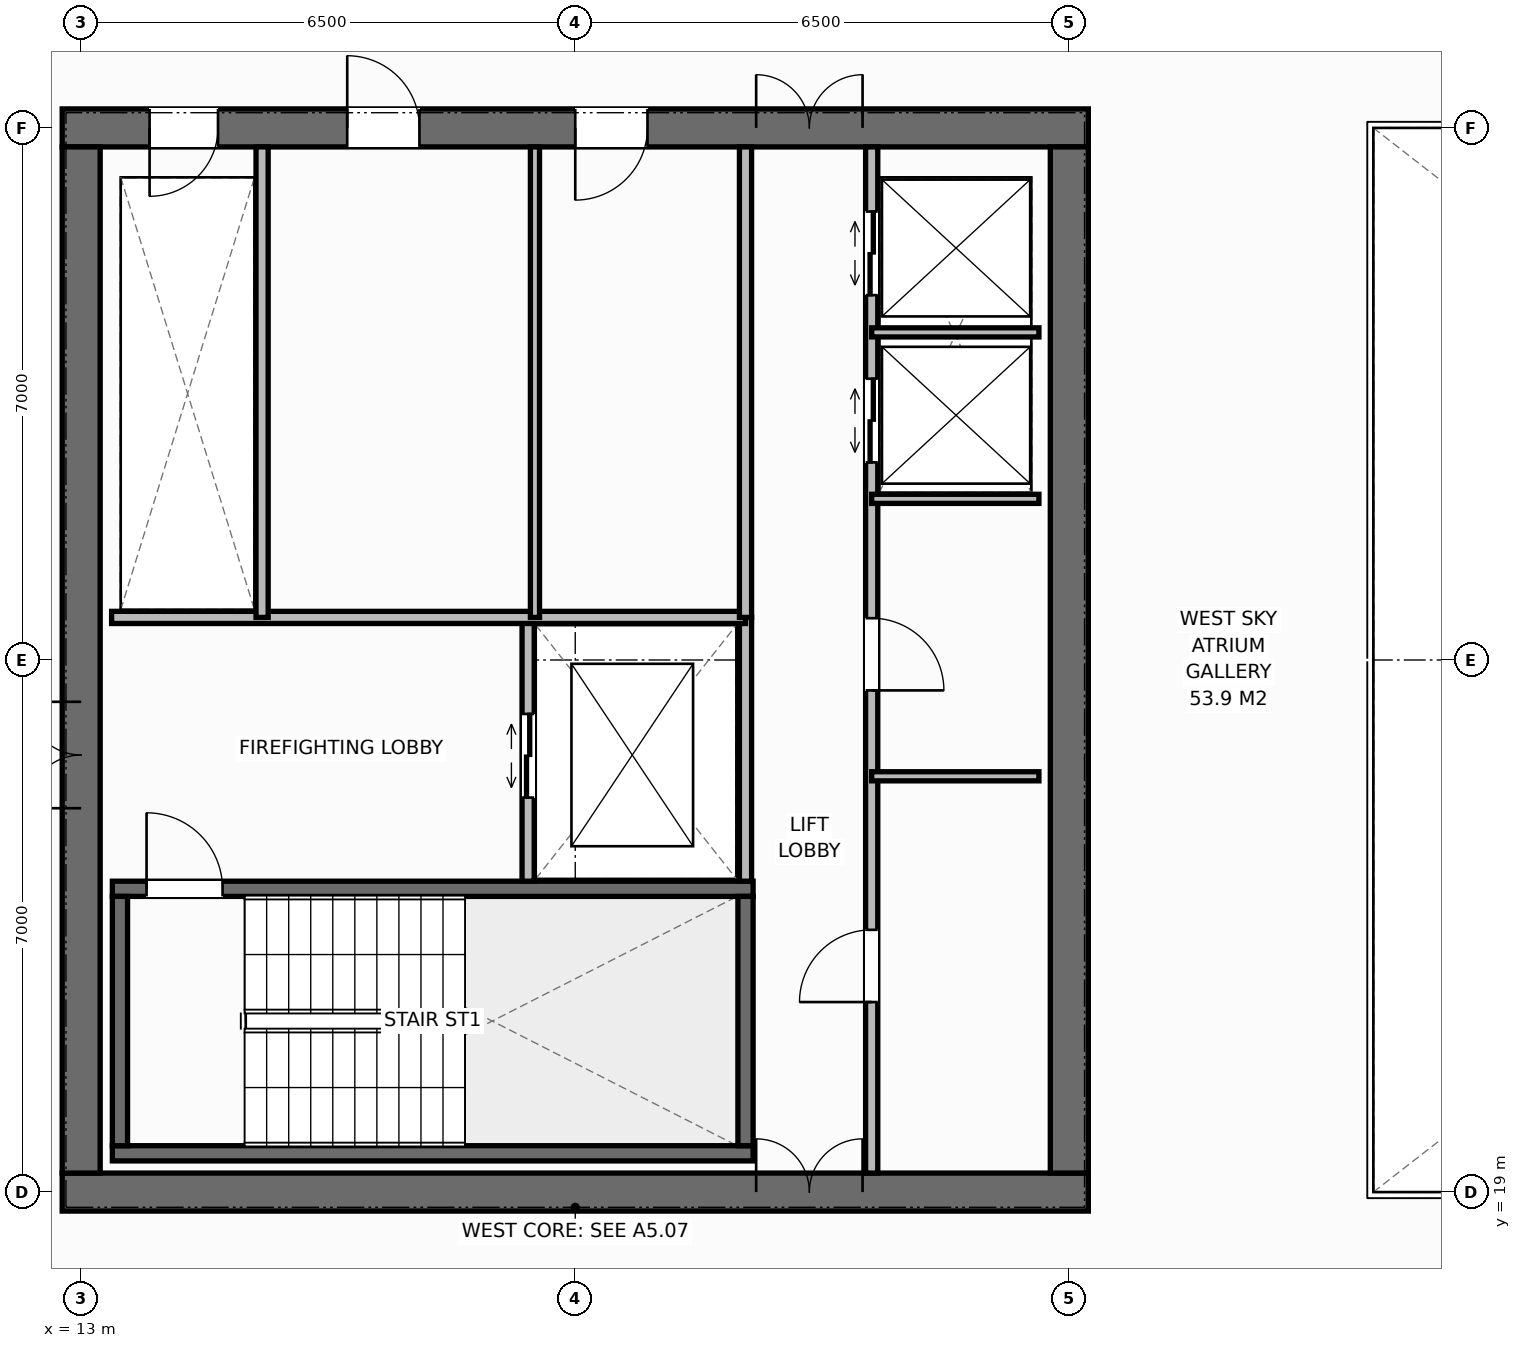
"""IFC4 building model, lengths in metres.
Left out: names, types, materials, properties, quantities, classifications, styles, units other than length and angle.
Written with IfcOpenShell. Run it as: python <this file> out.ifc"""

import sys

from ifc_helpers import new_model, si_unit, direction, frame, frame_2d, origin, place, context, subcontext, project, spatial, rectangle, extrude, element, fill, save


model = new_model("IFC4")
c1 = context("Model", 3, precision=1e-05, world=origin(), true_north=direction((0.0, 1.0)))
c2 = subcontext(c1, "Body", "Model", "MODEL_VIEW")
j1 = project(units=[si_unit("LENGTHUNIT", "METRE"), si_unit("PLANEANGLEUNIT", "RADIAN")], contexts=[c1])
p1 = place(None, origin())
s1 = spatial("IfcSite", under=j1, at=p1, CompositionType="ELEMENT")
p2 = place(p1, origin())
s2 = spatial("IfcBuilding", under=s1, at=p2, CompositionType="ELEMENT")
p3 = place(p2, frame((0.0, 0.0, 225.2)))
s3 = spatial("IfcBuildingStorey", under=s2, at=p3, CompositionType="ELEMENT", Elevation=225.2)
p4 = place(p3, frame((12.75, 19.0, 0.0), z_axis=(0.0, 0.0, 1.0), x_axis=(1.0, 0.0, 0.0)))
e1 = element("IfcWall", 1, at=p4, inside=s3, PredefinedType="SHEAR", context=c2, shape_type="SweptSolid", body=[
    extrude(rectangle(XDim=13.5, YDim=0.5, at=frame_2d((6.75, 0.0))), origin(), (0.0, 0.0, 1.0), 3.8),
])
p5 = place(p4, frame((9.13, 0.0, 0.0)))
e2 = element("IfcOpeningElement", 2, at=p5, cuts=e1, PredefinedType="OPENING", context=c2, shape_type="SweptSolid", body=[
    extrude(rectangle(XDim=1.4, YDim=2.2, at=frame_2d((0.7, 1.1))), frame((0.0, 0.26, 0.0), z_axis=(0.0, -1.0, 0.0), x_axis=(1.0, 0.0, 0.0)), (0.0, 0.0, 1.0), 0.52),
])
p6 = place(p3, frame((12.75, 33.0, 0.0), z_axis=(0.0, 0.0, 1.0), x_axis=(1.0, 0.0, 0.0)))
e3 = element("IfcWall", 3, at=p6, inside=s3, PredefinedType="SHEAR", context=c2, shape_type="SweptSolid", body=[
    extrude(rectangle(XDim=13.5, YDim=0.5, at=frame_2d((6.75, 0.0))), origin(), (0.0, 0.0, 1.0), 3.8),
])
p7 = place(p6, frame((1.15, 0.0, 0.0)))
e4 = element("IfcOpeningElement", 4, at=p7, cuts=e3, PredefinedType="OPENING", context=c2, shape_type="SweptSolid", body=[
    extrude(rectangle(XDim=0.9, YDim=2.15, at=frame_2d((0.45, 1.075))), frame((0.0, 0.26, 0.0), z_axis=(0.0, -1.0, 0.0), x_axis=(1.0, 0.0, 0.0)), (0.0, 0.0, 1.0), 0.52),
])
p8 = place(p6, frame((3.75, 0.0, 0.0)))
e5 = element("IfcOpeningElement", 5, at=p8, cuts=e3, PredefinedType="OPENING", context=c2, shape_type="SweptSolid", body=[
    extrude(rectangle(XDim=0.95, YDim=2.15, at=frame_2d((0.475, 1.075))), frame((0.0, 0.26, 0.0), z_axis=(0.0, -1.0, 0.0), x_axis=(1.0, 0.0, 0.0)), (0.0, 0.0, 1.0), 0.52),
])
p9 = place(p6, frame((6.75, 0.0, 0.0)))
e6 = element("IfcOpeningElement", 6, at=p9, cuts=e3, PredefinedType="OPENING", context=c2, shape_type="SweptSolid", body=[
    extrude(rectangle(XDim=0.95, YDim=2.15, at=frame_2d((0.475, 1.075))), frame((0.0, 0.26, 0.0), z_axis=(0.0, -1.0, 0.0), x_axis=(1.0, 0.0, 0.0)), (0.0, 0.0, 1.0), 0.52),
])
p10 = place(p6, frame((9.13, 0.0, 0.0)))
e7 = element("IfcOpeningElement", 7, at=p10, cuts=e3, PredefinedType="OPENING", context=c2, shape_type="SweptSolid", body=[
    extrude(rectangle(XDim=1.4, YDim=2.2, at=frame_2d((0.7, 1.1))), frame((0.0, 0.26, 0.0), z_axis=(0.0, -1.0, 0.0), x_axis=(1.0, 0.0, 0.0)), (0.0, 0.0, 1.0), 0.52),
])
p11 = place(p3, frame((13.0, 19.25, 0.0), z_axis=(0.0, 0.0, 1.0), x_axis=(0.0, 1.0, 0.0)))
e8 = element("IfcWall", 8, at=p11, inside=s3, PredefinedType="SHEAR", context=c2, shape_type="SweptSolid", body=[
    extrude(rectangle(XDim=13.5, YDim=0.5, at=frame_2d((6.75, 0.0))), origin(), (0.0, 0.0, 1.0), 3.8),
])
p12 = place(p11, frame((4.8, 0.0, 0.0)))
e9 = element("IfcOpeningElement", 9, at=p12, cuts=e8, PredefinedType="OPENING", context=c2, shape_type="SweptSolid", body=[
    extrude(rectangle(XDim=1.4, YDim=2.2, at=frame_2d((0.7, 1.1))), frame((0.0, 0.26, 0.0), z_axis=(0.0, -1.0, 0.0), x_axis=(1.0, 0.0, 0.0)), (0.0, 0.0, 1.0), 0.52),
])
p13 = place(p3, frame((26.0, 19.25, 0.0), z_axis=(0.0, 0.0, 1.0), x_axis=(0.0, 1.0, 0.0)))
e10 = element("IfcWall", 10, at=p13, inside=s3, PredefinedType="SHEAR", context=c2, shape_type="SweptSolid", body=[
    extrude(rectangle(XDim=13.5, YDim=0.5, at=frame_2d((6.75, 0.0))), origin(), (0.0, 0.0, 1.0), 3.8),
])
p14 = place(p3, frame((13.41, 19.51, 0.0), z_axis=(0.0, 0.0, 1.0), x_axis=(1.0, 0.0, 0.0)))
e11 = element("IfcWall", 11, at=p14, inside=s3, PredefinedType="SHEAR", context=c2, shape_type="SweptSolid", body=[
    extrude(rectangle(XDim=8.43, YDim=0.2, at=frame_2d((4.215, 0.0))), origin(), (0.0, 0.0, 1.0), 3.8),
])
p15 = place(p3, frame((13.41, 22.99, 0.0), z_axis=(0.0, 0.0, 1.0), x_axis=(1.0, 0.0, 0.0)))
e12 = element("IfcWall", 12, at=p15, inside=s3, PredefinedType="SHEAR", context=c2, shape_type="SweptSolid", body=[
    extrude(rectangle(XDim=8.43, YDim=0.2, at=frame_2d((4.215, 0.0))), origin(), (0.0, 0.0, 1.0), 3.8),
])
p16 = place(p15, frame((0.45, 0.0, 0.0)))
e13 = element("IfcOpeningElement", 13, at=p16, cuts=e12, PredefinedType="OPENING", context=c2, shape_type="SweptSolid", body=[
    extrude(rectangle(XDim=1.0, YDim=2.15, at=frame_2d((0.5, 1.075))), frame((0.0, 0.11, 0.0), z_axis=(0.0, -1.0, 0.0), x_axis=(1.0, 0.0, 0.0)), (0.0, 0.0, 1.0), 0.22),
])
for number, where, z_axis, x_axis in (
    (14, (13.51, 19.61, 0.0), (0.0, 0.0, 1.0), (0.0, 1.0, 0.0)),
    (15, (21.74, 19.61, 0.0), (0.0, 0.0, 1.0), (0.0, 1.0, 0.0)),
):
    element("IfcWall", number, at=place(p3, frame(where, z_axis=z_axis, x_axis=x_axis)), inside=s3, PredefinedType="SHEAR", context=c2, shape_type="SweptSolid", body=[
        extrude(rectangle(XDim=3.28, YDim=0.2, at=frame_2d((1.64, 0.0))), origin(), (0.0, 0.0, 1.0), 3.8),
    ])
p17 = place(p3, frame((21.74, 23.09, 0.0), z_axis=(0.0, 0.0, 1.0), x_axis=(0.0, 1.0, 0.0)))
e16 = element("IfcWall", 16, at=p17, inside=s3, PredefinedType="STANDARD", context=c2, shape_type="SweptSolid", body=[
    extrude(rectangle(XDim=3.47, YDim=0.16, at=frame_2d((1.735, 0.0))), origin(), (0.0, 0.0, 1.0), 3.58),
])
p18 = place(p3, frame((18.88, 23.09, 0.0), z_axis=(0.0, 0.0, 1.0), x_axis=(0.0, 1.0, 0.0)))
e17 = element("IfcWall", 17, at=p18, inside=s3, PredefinedType="STANDARD", context=c2, shape_type="SweptSolid", body=[
    extrude(rectangle(XDim=3.47, YDim=0.16, at=frame_2d((1.735, 0.0))), origin(), (0.0, 0.0, 1.0), 3.58),
])
p19 = place(p18, frame((1.1, 0.0, 0.0)))
e18 = element("IfcOpeningElement", 18, at=p19, cuts=e17, PredefinedType="OPENING", context=c2, shape_type="SweptSolid", body=[
    extrude(rectangle(XDim=1.1, YDim=2.2, at=frame_2d((0.55, 1.1))), frame((0.0, 0.09, 0.0), z_axis=(0.0, -1.0, 0.0), x_axis=(1.0, 0.0, 0.0)), (0.0, 0.0, 1.0), 0.18),
])
p20 = place(p3, frame((13.4, 26.56, 0.0), z_axis=(0.0, 0.0, 1.0), x_axis=(1.0, 0.0, 0.0)))
e19 = element("IfcWall", 19, at=p20, inside=s3, PredefinedType="STANDARD", context=c2, shape_type="SweptSolid", body=[
    extrude(rectangle(XDim=8.34, YDim=0.16, at=frame_2d((4.17, 0.0))), origin(), (0.0, 0.0, 1.0), 3.58),
])
p21 = place(p3, frame((15.38, 26.56, 0.0), z_axis=(0.0, 0.0, 1.0), x_axis=(0.0, 1.0, 0.0)))
e20 = element("IfcWall", 20, at=p21, inside=s3, PredefinedType="STANDARD", context=c2, shape_type="SweptSolid", body=[
    extrude(rectangle(XDim=6.19, YDim=0.16, at=frame_2d((3.095, 0.0))), origin(), (0.0, 0.0, 1.0), 3.58),
])
p22 = place(p3, frame((18.97, 26.56, 0.0), z_axis=(0.0, 0.0, 1.0), x_axis=(0.0, 1.0, 0.0)))
e21 = element("IfcWall", 21, at=p22, inside=s3, PredefinedType="PARTITIONING", context=c2, shape_type="SweptSolid", body=[
    extrude(rectangle(XDim=6.19, YDim=0.12, at=frame_2d((3.095, 0.0))), origin(), (0.0, 0.0, 1.0), 3.58),
])
p23 = place(p3, frame((21.74, 26.56, 0.0), z_axis=(0.0, 0.0, 1.0), x_axis=(0.0, 1.0, 0.0)))
e22 = element("IfcWall", 22, at=p23, inside=s3, PredefinedType="STANDARD", context=c2, shape_type="SweptSolid", body=[
    extrude(rectangle(XDim=6.19, YDim=0.16, at=frame_2d((3.095, 0.0))), origin(), (0.0, 0.0, 1.0), 3.58),
])
p24 = place(p3, frame((23.4, 19.25, 0.0), z_axis=(0.0, 0.0, 1.0), x_axis=(0.0, 1.0, 0.0)))
e23 = element("IfcWall", 23, at=p24, inside=s3, PredefinedType="STANDARD", context=c2, shape_type="SweptSolid", body=[
    extrude(rectangle(XDim=13.5, YDim=0.16, at=frame_2d((6.75, 0.0))), origin(), (0.0, 0.0, 1.0), 3.58),
])
p25 = place(p24, frame((2.25, 0.0, 0.0)))
e24 = element("IfcOpeningElement", 24, at=p25, cuts=e23, PredefinedType="OPENING", context=c2, shape_type="SweptSolid", body=[
    extrude(rectangle(XDim=0.95, YDim=2.15, at=frame_2d((0.475, 1.075))), frame((0.0, 0.09, 0.0), z_axis=(0.0, -1.0, 0.0), x_axis=(1.0, 0.0, 0.0)), (0.0, 0.0, 1.0), 0.18),
])
p26 = place(p24, frame((6.35, 0.0, 0.0)))
e25 = element("IfcOpeningElement", 25, at=p26, cuts=e23, PredefinedType="OPENING", context=c2, shape_type="SweptSolid", body=[
    extrude(rectangle(XDim=0.95, YDim=2.15, at=frame_2d((0.475, 1.075))), frame((0.0, 0.09, 0.0), z_axis=(0.0, -1.0, 0.0), x_axis=(1.0, 0.0, 0.0)), (0.0, 0.0, 1.0), 0.18),
])
p27 = place(p24, frame((9.35, 0.0, 0.0)))
e26 = element("IfcOpeningElement", 26, at=p27, cuts=e23, PredefinedType="OPENING", context=c2, shape_type="SweptSolid", body=[
    extrude(rectangle(XDim=1.1, YDim=2.2, at=frame_2d((0.55, 1.1))), frame((0.0, 0.09, 0.0), z_axis=(0.0, -1.0, 0.0), x_axis=(1.0, 0.0, 0.0)), (0.0, 0.0, 1.0), 0.18),
])
p28 = place(p24, frame((11.55, 0.0, 0.0)))
e27 = element("IfcOpeningElement", 27, at=p28, cuts=e23, PredefinedType="OPENING", context=c2, shape_type="SweptSolid", body=[
    extrude(rectangle(XDim=1.1, YDim=2.2, at=frame_2d((0.55, 1.1))), frame((0.0, 0.09, 0.0), z_axis=(0.0, -1.0, 0.0), x_axis=(1.0, 0.0, 0.0)), (0.0, 0.0, 1.0), 0.18),
])
for number, where, z_axis, x_axis in (
    (28, (23.4, 24.47, 0.0), (0.0, 0.0, 1.0), (1.0, 0.0, 0.0)),
    (29, (23.4, 28.12, 0.0), (0.0, 0.0, 1.0), (1.0, 0.0, 0.0)),
    (30, (23.4, 30.31, 0.0), (0.0, 0.0, 1.0), (1.0, 0.0, 0.0)),
):
    element("IfcWall", number, at=place(p3, frame(where, z_axis=z_axis, x_axis=x_axis)), inside=s3, PredefinedType="PARTITIONING", context=c2, shape_type="SweptSolid", body=[
        extrude(rectangle(XDim=2.2, YDim=0.12, at=frame_2d((1.1, 0.0))), origin(), (0.0, 0.0, 1.0), 3.58),
    ])
p29 = place(p16, origin())
e31 = element("IfcDoor", 31, at=p29, inside=s3, OperationType="SINGLE_SWING_LEFT", PredefinedType="DOOR", context=c2, shape_type="SweptSolid", body=[
    extrude(rectangle(XDim=1.0, YDim=2.15, at=frame_2d((0.5, 1.075))), frame((0.0, 0.025, 0.0), z_axis=(0.0, -1.0, 0.0), x_axis=(1.0, 0.0, 0.0)), (0.0, 0.0, 1.0), 0.05),
])
fill(e13, e31)
p30 = place(p12, origin())
e32 = element("IfcDoor", 32, at=p30, inside=s3, OperationType="DOUBLE_DOOR_SINGLE_SWING", PredefinedType="DOOR", context=c2, shape_type="SweptSolid", body=[
    extrude(rectangle(XDim=1.4, YDim=2.2, at=frame_2d((0.7, 1.1))), frame((0.0, 0.025, 0.0), z_axis=(0.0, -1.0, 0.0), x_axis=(1.0, 0.0, 0.0)), (0.0, 0.0, 1.0), 0.05),
])
fill(e9, e32)
p31 = place(p19, origin())
e33 = element("IfcDoor", 33, at=p31, inside=s3, OperationType="DOUBLE_DOOR_SLIDING", PredefinedType="DOOR", context=c2, shape_type="SweptSolid", body=[
    extrude(rectangle(XDim=1.1, YDim=2.2, at=frame_2d((0.55, 1.1))), frame((0.0, 0.025, 0.0), z_axis=(0.0, -1.0, 0.0), x_axis=(1.0, 0.0, 0.0)), (0.0, 0.0, 1.0), 0.05),
])
fill(e18, e33)
p32 = place(p7, origin())
e34 = element("IfcDoor", 34, at=p32, inside=s3, OperationType="SINGLE_SWING_RIGHT", PredefinedType="DOOR", context=c2, shape_type="SweptSolid", body=[
    extrude(rectangle(XDim=0.9, YDim=2.15, at=frame_2d((0.45, 1.075))), frame((0.0, -0.025, 0.0), z_axis=(0.0, -1.0, 0.0), x_axis=(1.0, 0.0, 0.0)), (0.0, 0.0, 1.0), 0.05),
])
fill(e4, e34)
p33 = place(p8, origin())
e35 = element("IfcDoor", 35, at=p33, inside=s3, OperationType="SINGLE_SWING_LEFT", PredefinedType="DOOR", context=c2, shape_type="SweptSolid", body=[
    extrude(rectangle(XDim=0.95, YDim=2.15, at=frame_2d((0.475, 1.075))), frame((0.0, -0.025, 0.0), z_axis=(0.0, -1.0, 0.0), x_axis=(1.0, 0.0, 0.0)), (0.0, 0.0, 1.0), 0.05),
])
fill(e5, e35)
p34 = place(p9, origin())
e36 = element("IfcDoor", 36, at=p34, inside=s3, OperationType="SINGLE_SWING_RIGHT", PredefinedType="DOOR", context=c2, shape_type="SweptSolid", body=[
    extrude(rectangle(XDim=0.95, YDim=2.15, at=frame_2d((0.475, 1.075))), frame((0.0, -0.025, 0.0), z_axis=(0.0, -1.0, 0.0), x_axis=(1.0, 0.0, 0.0)), (0.0, 0.0, 1.0), 0.05),
])
fill(e6, e36)
p35 = place(p5, origin())
e37 = element("IfcDoor", 37, at=p35, inside=s3, OperationType="DOUBLE_DOOR_SINGLE_SWING", PredefinedType="DOOR", context=c2, shape_type="SweptSolid", body=[
    extrude(rectangle(XDim=1.4, YDim=2.2, at=frame_2d((0.7, 1.1))), frame((0.0, 0.075, 0.0), z_axis=(0.0, -1.0, 0.0), x_axis=(1.0, 0.0, 0.0)), (0.0, 0.0, 1.0), 0.05),
])
fill(e2, e37)
p36 = place(p10, origin())
e38 = element("IfcDoor", 38, at=p36, inside=s3, OperationType="DOUBLE_DOOR_SINGLE_SWING", PredefinedType="DOOR", context=c2, shape_type="SweptSolid", body=[
    extrude(rectangle(XDim=1.4, YDim=2.2, at=frame_2d((0.7, 1.1))), frame((0.0, -0.025, 0.0), z_axis=(0.0, -1.0, 0.0), x_axis=(1.0, 0.0, 0.0)), (0.0, 0.0, 1.0), 0.05),
])
fill(e7, e38)
p37 = place(p25, origin())
e39 = element("IfcDoor", 39, at=p37, inside=s3, OperationType="SINGLE_SWING_LEFT", PredefinedType="DOOR", context=c2, shape_type="SweptSolid", body=[
    extrude(rectangle(XDim=0.95, YDim=2.15, at=frame_2d((0.475, 1.075))), frame((0.0, 0.025, 0.0), z_axis=(0.0, -1.0, 0.0), x_axis=(1.0, 0.0, 0.0)), (0.0, 0.0, 1.0), 0.05),
])
fill(e24, e39)
p38 = place(p26, origin())
e40 = element("IfcDoor", 40, at=p38, inside=s3, OperationType="SINGLE_SWING_RIGHT", PredefinedType="DOOR", context=c2, shape_type="SweptSolid", body=[
    extrude(rectangle(XDim=0.95, YDim=2.15, at=frame_2d((0.475, 1.075))), frame((0.0, 0.025, 0.0), z_axis=(0.0, -1.0, 0.0), x_axis=(1.0, 0.0, 0.0)), (0.0, 0.0, 1.0), 0.05),
])
fill(e25, e40)
p39 = place(p27, origin())
e41 = element("IfcDoor", 41, at=p39, inside=s3, OperationType="DOUBLE_DOOR_SLIDING", PredefinedType="DOOR", context=c2, shape_type="SweptSolid", body=[
    extrude(rectangle(XDim=1.1, YDim=2.2, at=frame_2d((0.55, 1.1))), frame((0.0, 0.025, 0.0), z_axis=(0.0, -1.0, 0.0), x_axis=(1.0, 0.0, 0.0)), (0.0, 0.0, 1.0), 0.05),
])
fill(e26, e41)
p40 = place(p28, origin())
e42 = element("IfcDoor", 42, at=p40, inside=s3, OperationType="DOUBLE_DOOR_SLIDING", PredefinedType="DOOR", context=c2, shape_type="SweptSolid", body=[
    extrude(rectangle(XDim=1.1, YDim=2.2, at=frame_2d((0.55, 1.1))), frame((0.0, 0.025, 0.0), z_axis=(0.0, -1.0, 0.0), x_axis=(1.0, 0.0, 0.0)), (0.0, 0.0, 1.0), 0.05),
])
fill(e27, e42)
save(model, sys.argv[1])
